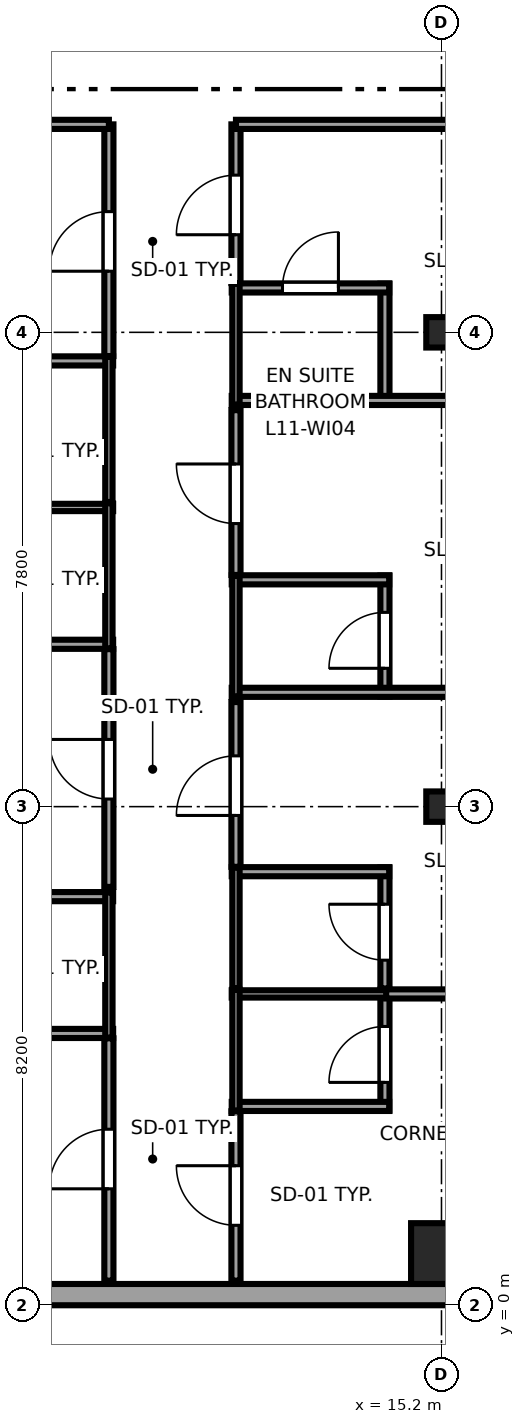
"""IFC4 building model, lengths in metres.
Left out: names, types, materials, properties, quantities, classifications, styles, units other than length and angle.
Written with IfcOpenShell. Run it as: python <this file> out.ifc"""

import sys

from ifc_helpers import new_model, si_unit, direction, frame, frame_2d, origin, origin_2d, place, context, subcontext, project, spatial, rectangle, i_section, extrude, source, transform, mapped, element, fill, save


model = new_model("IFC4")
c1 = context("Model", 3, precision=1e-05, world=origin(), true_north=direction((0.0, 1.0)))
c2 = subcontext(c1, "Body", "Model", "MODEL_VIEW")
j1 = project(units=[si_unit("LENGTHUNIT", "METRE"), si_unit("PLANEANGLEUNIT", "RADIAN")], contexts=[c1])
p1 = place(None, origin())
s1 = spatial("IfcSite", under=j1, at=p1, CompositionType="ELEMENT")
p2 = place(p1, origin())
s2 = spatial("IfcBuilding", under=s1, at=p2, CompositionType="ELEMENT")
p3 = place(p2, frame((0.0, 0.0, 49.75)))
s3 = spatial("IfcBuildingStorey", under=s2, at=p3, CompositionType="ELEMENT", Elevation=49.75)
m1 = source(origin(), c2, "Body", "SweptSolid", [
    extrude(rectangle(XDim=1.0, YDim=1.0, at=origin_2d()), origin(), (0.0, 0.0, 1.0), 3.55),
])
p4 = place(p3, frame((15.2, 0.85, 0.0), z_axis=(0.0, 0.0, 1.0), x_axis=(1.0, 0.0, 0.0)))
e1 = element("IfcColumn", 1, at=p4, inside=s3, PredefinedType="COLUMN", context=c2, shape_type="MappedRepresentation", body=[
    mapped(m1, transform((0.0, 0.0, 0.0), x_axis=(1.0, 0.0, 0.0), y_axis=(0.0, 1.0, 0.0), z_axis=(0.0, 0.0, 1.0), scale=1.0)),
])
m2 = source(origin(), c2, "Body", "SweptSolid", [
    extrude(i_section(OverallWidth=0.5, OverallDepth=0.5, WebThickness=0.028, FlangeThickness=0.045, at=origin_2d()), origin(), (0.0, 0.0, 1.0), 3.55),
])
for number, where, z_axis, x_axis in (
    (2, (15.2, 8.2, 0.0), (0.0, 0.0, 1.0), (1.0, 0.0, 0.0)),
    (3, (15.2, 16.0, 0.0), (0.0, 0.0, 1.0), (1.0, 0.0, 0.0)),
):
    element("IfcColumn", number, at=place(p3, frame(where, z_axis=z_axis, x_axis=x_axis)), inside=s3, PredefinedType="COLUMN", context=c2, shape_type="MappedRepresentation", body=[
        mapped(m2, transform((0.0, 0.0, 0.0), x_axis=(1.0, 0.0, 0.0), y_axis=(0.0, 1.0, 0.0), z_axis=(0.0, 0.0, 1.0), scale=1.0)),
    ])
p5 = place(p3, frame((4.617, 0.175, 0.0), z_axis=(0.0, 0.0, 1.0), x_axis=(1.0, 0.0, 0.0)))
e4 = element("IfcWall", 4, at=p5, inside=s3, PredefinedType="SOLIDWALL", context=c2, shape_type="SweptSolid", body=[
    extrude(rectangle(XDim=18.008, YDim=0.35, at=frame_2d((9.004, 0.0))), origin(), (0.0, 0.0, 1.0), 3.37),
])
p6 = place(p5, frame((14.407, 0.0, 0.68)))
e5 = element("IfcOpeningElement", 5, at=p6, cuts=e4, PredefinedType="OPENING", context=c2, shape_type="SweptSolid", body=[
    extrude(rectangle(XDim=1.8, YDim=1.85, at=frame_2d((0.9, 0.925))), frame((0.0, 0.185, 0.0), z_axis=(0.0, -1.0, 0.0), x_axis=(1.0, 0.0, 0.0)), (0.0, 0.0, 1.0), 0.37),
])
for number, where, z_axis, x_axis in (
    (6, (7.21, 4.47, 0.0), (0.0, 0.0, 1.0), (1.0, 0.0, 0.0)),
    (7, (7.21, 6.72, 0.0), (0.0, 0.0, 1.0), (1.0, 0.0, 0.0)),
):
    element("IfcWall", number, at=place(p3, frame(where, z_axis=z_axis, x_axis=x_axis)), inside=s3, PredefinedType="PARTITIONING", context=c2, shape_type="SweptSolid", body=[
        extrude(rectangle(XDim=2.59, YDim=0.15, at=frame_2d((1.295, 0.0))), origin(), (0.0, 0.0, 1.0), 3.37),
    ])
p7 = place(p3, frame((9.73, 4.4, 0.0), z_axis=(0.0, 0.0, 1.0), x_axis=(0.0, 1.0, 0.0)))
e8 = element("IfcWall", 8, at=p7, inside=s3, PredefinedType="PLUMBINGWALL", context=c2, shape_type="SweptSolid", body=[
    extrude(rectangle(XDim=2.39, YDim=0.12, at=frame_2d((1.195, 0.0))), origin(), (0.0, 0.0, 1.0), 3.37),
])
p8 = place(p3, frame((7.21, 10.87, 0.0), z_axis=(0.0, 0.0, 1.0), x_axis=(1.0, 0.0, 0.0)))
e9 = element("IfcWall", 9, at=p8, inside=s3, PredefinedType="PARTITIONING", context=c2, shape_type="SweptSolid", body=[
    extrude(rectangle(XDim=2.59, YDim=0.15, at=frame_2d((1.295, 0.0))), origin(), (0.0, 0.0, 1.0), 3.37),
])
p9 = place(p3, frame((7.21, 13.12, 0.0), z_axis=(0.0, 0.0, 1.0), x_axis=(1.0, 0.0, 0.0)))
e10 = element("IfcWall", 10, at=p9, inside=s3, PredefinedType="PLUMBINGWALL", context=c2, shape_type="SweptSolid", body=[
    extrude(rectangle(XDim=2.59, YDim=0.12, at=frame_2d((1.295, 0.0))), origin(), (0.0, 0.0, 1.0), 3.37),
])
p10 = place(p3, frame((9.73, 10.8, 0.0), z_axis=(0.0, 0.0, 1.0), x_axis=(0.0, 1.0, 0.0)))
e11 = element("IfcWall", 11, at=p10, inside=s3, PredefinedType="PLUMBINGWALL", context=c2, shape_type="SweptSolid", body=[
    extrude(rectangle(XDim=2.39, YDim=0.12, at=frame_2d((1.195, 0.0))), origin(), (0.0, 0.0, 1.0), 3.37),
])
p11 = place(p3, frame((7.21, 15.53, 0.0), z_axis=(0.0, 0.0, 1.0), x_axis=(1.0, 0.0, 0.0)))
e12 = element("IfcWall", 12, at=p11, inside=s3, PredefinedType="PARTITIONING", context=c2, shape_type="SweptSolid", body=[
    extrude(rectangle(XDim=2.59, YDim=0.15, at=frame_2d((1.295, 0.0))), origin(), (0.0, 0.0, 1.0), 3.37),
])
p12 = place(p3, frame((9.73, 13.21, 0.0), z_axis=(0.0, 0.0, 1.0), x_axis=(0.0, 1.0, 0.0)))
e13 = element("IfcWall", 13, at=p12, inside=s3, PredefinedType="PLUMBINGWALL", context=c2, shape_type="SweptSolid", body=[
    extrude(rectangle(XDim=2.39, YDim=0.12, at=frame_2d((1.195, 0.0))), origin(), (0.0, 0.0, 1.0), 3.37),
])
p13 = place(p3, frame((14.27, 3.2, 0.0), z_axis=(0.0, 0.0, 1.0), x_axis=(0.0, 1.0, 0.0)))
e14 = element("IfcWall", 14, at=p13, inside=s3, PredefinedType="PARTITIONING", context=c2, shape_type="SweptSolid", body=[
    extrude(rectangle(XDim=1.99, YDim=0.15, at=frame_2d((0.995, 0.0))), origin(), (0.0, 0.0, 1.0), 3.37),
])
p14 = place(p13, frame((0.465, 0.0, 0.0)))
e15 = element("IfcOpeningElement", 15, at=p14, cuts=e14, PredefinedType="OPENING", context=c2, shape_type="SweptSolid", body=[
    extrude(rectangle(XDim=0.92, YDim=2.01, at=frame_2d((0.46, 1.005))), frame((0.0, 0.085, 0.0), z_axis=(0.0, -1.0, 0.0), x_axis=(1.0, 0.0, 0.0)), (0.0, 0.0, 1.0), 0.17),
])
p15 = place(p3, frame((11.75, 3.27, 0.0), z_axis=(0.0, 0.0, 1.0), x_axis=(1.0, 0.0, 0.0)))
e16 = element("IfcWall", 16, at=p15, inside=s3, PredefinedType="PARTITIONING", context=c2, shape_type="SweptSolid", body=[
    extrude(rectangle(XDim=2.59, YDim=0.15, at=frame_2d((1.295, 0.0))), origin(), (0.0, 0.0, 1.0), 3.37),
])
p16 = place(p3, frame((11.75, 5.12, 0.0), z_axis=(0.0, 0.0, 1.0), x_axis=(1.0, 0.0, 0.0)))
e17 = element("IfcWall", 17, at=p16, inside=s3, PredefinedType="PLUMBINGWALL", context=c2, shape_type="SweptSolid", body=[
    extrude(rectangle(XDim=2.59, YDim=0.12, at=frame_2d((1.295, 0.0))), origin(), (0.0, 0.0, 1.0), 3.37),
])
p17 = place(p3, frame((11.82, 3.2, 0.0), z_axis=(0.0, 0.0, 1.0), x_axis=(0.0, 1.0, 0.0)))
e18 = element("IfcWall", 18, at=p17, inside=s3, PredefinedType="PLUMBINGWALL", context=c2, shape_type="SweptSolid", body=[
    extrude(rectangle(XDim=1.99, YDim=0.12, at=frame_2d((0.995, 0.0))), origin(), (0.0, 0.0, 1.0), 3.37),
])
p18 = place(p3, frame((14.27, 5.21, 0.0), z_axis=(0.0, 0.0, 1.0), x_axis=(0.0, 1.0, 0.0)))
e19 = element("IfcWall", 19, at=p18, inside=s3, PredefinedType="PARTITIONING", context=c2, shape_type="SweptSolid", body=[
    extrude(rectangle(XDim=1.99, YDim=0.15, at=frame_2d((0.995, 0.0))), origin(), (0.0, 0.0, 1.0), 3.37),
])
p19 = place(p18, frame((0.465, 0.0, 0.0)))
e20 = element("IfcOpeningElement", 20, at=p19, cuts=e19, PredefinedType="OPENING", context=c2, shape_type="SweptSolid", body=[
    extrude(rectangle(XDim=0.92, YDim=2.01, at=frame_2d((0.46, 1.005))), frame((0.0, 0.085, 0.0), z_axis=(0.0, -1.0, 0.0), x_axis=(1.0, 0.0, 0.0)), (0.0, 0.0, 1.0), 0.17),
])
p20 = place(p3, frame((11.75, 7.13, 0.0), z_axis=(0.0, 0.0, 1.0), x_axis=(1.0, 0.0, 0.0)))
e21 = element("IfcWall", 21, at=p20, inside=s3, PredefinedType="PARTITIONING", context=c2, shape_type="SweptSolid", body=[
    extrude(rectangle(XDim=2.59, YDim=0.15, at=frame_2d((1.295, 0.0))), origin(), (0.0, 0.0, 1.0), 3.37),
])
p21 = place(p3, frame((11.82, 5.21, 0.0), z_axis=(0.0, 0.0, 1.0), x_axis=(0.0, 1.0, 0.0)))
e22 = element("IfcWall", 22, at=p21, inside=s3, PredefinedType="PLUMBINGWALL", context=c2, shape_type="SweptSolid", body=[
    extrude(rectangle(XDim=1.99, YDim=0.12, at=frame_2d((0.995, 0.0))), origin(), (0.0, 0.0, 1.0), 3.37),
])
p22 = place(p3, frame((14.27, 10.01, 0.0), z_axis=(0.0, 0.0, 1.0), x_axis=(0.0, 1.0, 0.0)))
e23 = element("IfcWall", 23, at=p22, inside=s3, PredefinedType="PARTITIONING", context=c2, shape_type="SweptSolid", body=[
    extrude(rectangle(XDim=1.99, YDim=0.15, at=frame_2d((0.995, 0.0))), origin(), (0.0, 0.0, 1.0), 3.37),
])
p23 = place(p22, frame((0.465, 0.0, 0.0)))
e24 = element("IfcOpeningElement", 24, at=p23, cuts=e23, PredefinedType="OPENING", context=c2, shape_type="SweptSolid", body=[
    extrude(rectangle(XDim=0.92, YDim=2.01, at=frame_2d((0.46, 1.005))), frame((0.0, 0.085, 0.0), z_axis=(0.0, -1.0, 0.0), x_axis=(1.0, 0.0, 0.0)), (0.0, 0.0, 1.0), 0.17),
])
p24 = place(p3, frame((11.75, 10.08, 0.0), z_axis=(0.0, 0.0, 1.0), x_axis=(1.0, 0.0, 0.0)))
e25 = element("IfcWall", 25, at=p24, inside=s3, PredefinedType="PARTITIONING", context=c2, shape_type="SweptSolid", body=[
    extrude(rectangle(XDim=10.6, YDim=0.15, at=frame_2d((5.3, 0.0))), origin(), (0.0, 0.0, 1.0), 3.37),
])
p25 = place(p3, frame((11.75, 11.93, 0.0), z_axis=(0.0, 0.0, 1.0), x_axis=(1.0, 0.0, 0.0)))
e26 = element("IfcWall", 26, at=p25, inside=s3, PredefinedType="PARTITIONING", context=c2, shape_type="SweptSolid", body=[
    extrude(rectangle(XDim=2.59, YDim=0.15, at=frame_2d((1.295, 0.0))), origin(), (0.0, 0.0, 1.0), 3.37),
])
p26 = place(p3, frame((11.82, 10.01, 0.0), z_axis=(0.0, 0.0, 1.0), x_axis=(0.0, 1.0, 0.0)))
e27 = element("IfcWall", 27, at=p26, inside=s3, PredefinedType="PLUMBINGWALL", context=c2, shape_type="SweptSolid", body=[
    extrude(rectangle(XDim=1.99, YDim=0.12, at=frame_2d((0.995, 0.0))), origin(), (0.0, 0.0, 1.0), 3.37),
])
p27 = place(p3, frame((14.27, 14.81, 0.0), z_axis=(0.0, 0.0, 1.0), x_axis=(0.0, 1.0, 0.0)))
e28 = element("IfcWall", 28, at=p27, inside=s3, PredefinedType="PARTITIONING", context=c2, shape_type="SweptSolid", body=[
    extrude(rectangle(XDim=1.99, YDim=0.15, at=frame_2d((0.995, 0.0))), origin(), (0.0, 0.0, 1.0), 3.37),
])
p28 = place(p3, frame((11.75, 14.88, 0.0), z_axis=(0.0, 0.0, 1.0), x_axis=(1.0, 0.0, 0.0)))
e29 = element("IfcWall", 29, at=p28, inside=s3, PredefinedType="PARTITIONING", context=c2, shape_type="SweptSolid", body=[
    extrude(rectangle(XDim=10.6, YDim=0.15, at=frame_2d((5.3, 0.0))), origin(), (0.0, 0.0, 1.0), 3.37),
])
p29 = place(p3, frame((11.75, 16.73, 0.0), z_axis=(0.0, 0.0, 1.0), x_axis=(1.0, 0.0, 0.0)))
e30 = element("IfcWall", 30, at=p29, inside=s3, PredefinedType="PARTITIONING", context=c2, shape_type="SweptSolid", body=[
    extrude(rectangle(XDim=2.59, YDim=0.15, at=frame_2d((1.295, 0.0))), origin(), (0.0, 0.0, 1.0), 3.37),
])
p30 = place(p29, frame((0.835, 0.0, 0.0)))
e31 = element("IfcOpeningElement", 31, at=p30, cuts=e30, PredefinedType="OPENING", context=c2, shape_type="SweptSolid", body=[
    extrude(rectangle(XDim=0.92, YDim=2.01, at=frame_2d((0.46, 1.005))), frame((0.0, 0.085, 0.0), z_axis=(0.0, -1.0, 0.0), x_axis=(1.0, 0.0, 0.0)), (0.0, 0.0, 1.0), 0.17),
])
p31 = place(p3, frame((11.82, 14.81, 0.0), z_axis=(0.0, 0.0, 1.0), x_axis=(0.0, 1.0, 0.0)))
e32 = element("IfcWall", 32, at=p31, inside=s3, PredefinedType="PLUMBINGWALL", context=c2, shape_type="SweptSolid", body=[
    extrude(rectangle(XDim=1.99, YDim=0.12, at=frame_2d((0.995, 0.0))), origin(), (0.0, 0.0, 1.0), 3.37),
])
p32 = place(p3, frame((9.73, 0.405, 0.0), z_axis=(0.0, 0.0, 1.0), x_axis=(0.0, 1.0, 0.0)))
e33 = element("IfcWall", 33, at=p32, inside=s3, PredefinedType="PARTITIONING", context=c2, shape_type="SweptSolid", body=[
    extrude(rectangle(XDim=3.985, YDim=0.15, at=frame_2d((1.992, 0.0))), origin(), (0.0, 0.0, 1.0), 3.37),
])
p33 = place(p32, frame((1.51, 0.0, 0.0)))
e34 = element("IfcOpeningElement", 34, at=p33, cuts=e33, PredefinedType="OPENING", context=c2, shape_type="SweptSolid", body=[
    extrude(rectangle(XDim=0.98, YDim=2.12, at=frame_2d((0.49, 1.06))), frame((0.0, 0.085, 0.0), z_axis=(0.0, -1.0, 0.0), x_axis=(1.0, 0.0, 0.0)), (0.0, 0.0, 1.0), 0.17),
])
p34 = place(p3, frame((9.73, 6.88, 0.0), z_axis=(0.0, 0.0, 1.0), x_axis=(0.0, 1.0, 0.0)))
e35 = element("IfcWall", 35, at=p34, inside=s3, PredefinedType="PARTITIONING", context=c2, shape_type="SweptSolid", body=[
    extrude(rectangle(XDim=3.91, YDim=0.15, at=frame_2d((1.955, 0.0))), origin(), (0.0, 0.0, 1.0), 3.37),
])
p35 = place(p34, frame((1.445, 0.0, 0.0)))
e36 = element("IfcOpeningElement", 36, at=p35, cuts=e35, PredefinedType="OPENING", context=c2, shape_type="SweptSolid", body=[
    extrude(rectangle(XDim=0.98, YDim=2.12, at=frame_2d((0.49, 1.06))), frame((0.0, 0.085, 0.0), z_axis=(0.0, -1.0, 0.0), x_axis=(1.0, 0.0, 0.0)), (0.0, 0.0, 1.0), 0.17),
])
p36 = place(p3, frame((9.73, 15.61, 0.0), z_axis=(0.0, 0.0, 1.0), x_axis=(0.0, 1.0, 0.0)))
e37 = element("IfcWall", 37, at=p36, inside=s3, PredefinedType="PARTITIONING", context=c2, shape_type="SweptSolid", body=[
    extrude(rectangle(XDim=3.81, YDim=0.15, at=frame_2d((1.905, 0.0))), origin(), (0.0, 0.0, 1.0), 3.37),
])
p37 = place(p36, frame((1.395, 0.0, 0.0)))
e38 = element("IfcOpeningElement", 38, at=p37, cuts=e37, PredefinedType="OPENING", context=c2, shape_type="SweptSolid", body=[
    extrude(rectangle(XDim=0.98, YDim=2.12, at=frame_2d((0.49, 1.06))), frame((0.0, 0.085, 0.0), z_axis=(0.0, -1.0, 0.0), x_axis=(1.0, 0.0, 0.0)), (0.0, 0.0, 1.0), 0.17),
])
p38 = place(p3, frame((0.405, 19.42, 0.0), z_axis=(0.0, 0.0, 1.0), x_axis=(1.0, 0.0, 0.0)))
e39 = element("IfcWall", 39, at=p38, inside=s3, PredefinedType="PARTITIONING", context=c2, shape_type="SweptSolid", body=[
    extrude(rectangle(XDim=9.325, YDim=0.15, at=frame_2d((4.663, 0.0))), origin(), (0.0, 0.0, 1.0), 3.37),
])
p39 = place(p3, frame((11.82, 0.405, 0.0), z_axis=(0.0, 0.0, 1.0), x_axis=(0.0, 1.0, 0.0)))
e40 = element("IfcWall", 40, at=p39, inside=s3, PredefinedType="PARTITIONING", context=c2, shape_type="SweptSolid", body=[
    extrude(rectangle(XDim=2.785, YDim=0.15, at=frame_2d((1.393, 0.0))), origin(), (0.0, 0.0, 1.0), 3.37),
])
p40 = place(p39, frame((0.91, 0.0, 0.0)))
e41 = element("IfcOpeningElement", 41, at=p40, cuts=e40, PredefinedType="OPENING", context=c2, shape_type="SweptSolid", body=[
    extrude(rectangle(XDim=0.98, YDim=2.12, at=frame_2d((0.49, 1.06))), frame((0.0, 0.085, 0.0), z_axis=(0.0, -1.0, 0.0), x_axis=(1.0, 0.0, 0.0)), (0.0, 0.0, 1.0), 0.17),
])
p41 = place(p3, frame((14.29, 5.12, 0.0), z_axis=(0.0, 0.0, 1.0), x_axis=(1.0, 0.0, 0.0)))
e42 = element("IfcWall", 42, at=p41, inside=s3, PredefinedType="PARTITIONING", context=c2, shape_type="SweptSolid", body=[
    extrude(rectangle(XDim=8.06, YDim=0.15, at=frame_2d((4.03, 0.0))), origin(), (0.0, 0.0, 1.0), 3.37),
])
p42 = place(p3, frame((11.82, 7.21, 0.0), z_axis=(0.0, 0.0, 1.0), x_axis=(0.0, 1.0, 0.0)))
e43 = element("IfcWall", 43, at=p42, inside=s3, PredefinedType="PARTITIONING", context=c2, shape_type="SweptSolid", body=[
    extrude(rectangle(XDim=2.71, YDim=0.15, at=frame_2d((1.355, 0.0))), origin(), (0.0, 0.0, 1.0), 3.37),
])
p43 = place(p42, frame((0.845, 0.0, 0.0)))
e44 = element("IfcOpeningElement", 44, at=p43, cuts=e43, PredefinedType="OPENING", context=c2, shape_type="SweptSolid", body=[
    extrude(rectangle(XDim=0.98, YDim=2.12, at=frame_2d((0.49, 1.06))), frame((0.0, 0.085, 0.0), z_axis=(0.0, -1.0, 0.0), x_axis=(1.0, 0.0, 0.0)), (0.0, 0.0, 1.0), 0.17),
])
p44 = place(p3, frame((11.82, 12.01, 0.0), z_axis=(0.0, 0.0, 1.0), x_axis=(0.0, 1.0, 0.0)))
e45 = element("IfcWall", 45, at=p44, inside=s3, PredefinedType="PARTITIONING", context=c2, shape_type="SweptSolid", body=[
    extrude(rectangle(XDim=2.71, YDim=0.15, at=frame_2d((1.355, 0.0))), origin(), (0.0, 0.0, 1.0), 3.37),
])
p45 = place(p44, frame((0.845, 0.0, 0.0)))
e46 = element("IfcOpeningElement", 46, at=p45, cuts=e45, PredefinedType="OPENING", context=c2, shape_type="SweptSolid", body=[
    extrude(rectangle(XDim=0.98, YDim=2.12, at=frame_2d((0.49, 1.06))), frame((0.0, 0.085, 0.0), z_axis=(0.0, -1.0, 0.0), x_axis=(1.0, 0.0, 0.0)), (0.0, 0.0, 1.0), 0.17),
])
p46 = place(p3, frame((11.82, 16.81, 0.0), z_axis=(0.0, 0.0, 1.0), x_axis=(0.0, 1.0, 0.0)))
e47 = element("IfcWall", 47, at=p46, inside=s3, PredefinedType="PARTITIONING", context=c2, shape_type="SweptSolid", body=[
    extrude(rectangle(XDim=2.61, YDim=0.15, at=frame_2d((1.305, 0.0))), origin(), (0.0, 0.0, 1.0), 3.37),
])
p47 = place(p46, frame((0.795, 0.0, 0.0)))
e48 = element("IfcOpeningElement", 48, at=p47, cuts=e47, PredefinedType="OPENING", context=c2, shape_type="SweptSolid", body=[
    extrude(rectangle(XDim=0.98, YDim=2.12, at=frame_2d((0.49, 1.06))), frame((0.0, 0.085, 0.0), z_axis=(0.0, -1.0, 0.0), x_axis=(1.0, 0.0, 0.0)), (0.0, 0.0, 1.0), 0.17),
])
p48 = place(p3, frame((11.82, 19.42, 0.0), z_axis=(0.0, 0.0, 1.0), x_axis=(1.0, 0.0, 0.0)))
e49 = element("IfcWall", 49, at=p48, inside=s3, PredefinedType="PARTITIONING", context=c2, shape_type="SweptSolid", body=[
    extrude(rectangle(XDim=10.53, YDim=0.15, at=frame_2d((5.265, 0.0))), origin(), (0.0, 0.0, 1.0), 3.37),
])
m3 = source(origin(), c2, "Body", "SweptSolid", [
    extrude(rectangle(XDim=0.92, YDim=2.01, at=frame_2d((0.46, 1.005))), frame((0.0, 0.025, 0.0), z_axis=(0.0, -1.0, 0.0), x_axis=(1.0, 0.0, 0.0)), (0.0, 0.0, 1.0), 0.05),
])
p49 = place(p14, origin())
e50 = element("IfcDoor", 50, at=p49, inside=s3, OperationType="SINGLE_SWING_LEFT", PredefinedType="DOOR", context=c2, shape_type="MappedRepresentation", body=[
    mapped(m3, transform((0.0, 0.0, 0.0), x_axis=(1.0, 0.0, 0.0), y_axis=(0.0, 1.0, 0.0), z_axis=(0.0, 0.0, 1.0), scale=1.0)),
])
fill(e15, e50)
p50 = place(p19, origin())
e51 = element("IfcDoor", 51, at=p50, inside=s3, OperationType="SINGLE_SWING_RIGHT", PredefinedType="DOOR", context=c2, shape_type="MappedRepresentation", body=[
    mapped(m3, transform((0.0, 0.0, 0.0), x_axis=(1.0, 0.0, 0.0), y_axis=(0.0, 1.0, 0.0), z_axis=(0.0, 0.0, 1.0), scale=1.0)),
])
fill(e20, e51)
p51 = place(p23, origin())
e52 = element("IfcDoor", 52, at=p51, inside=s3, OperationType="SINGLE_SWING_LEFT", PredefinedType="DOOR", context=c2, shape_type="MappedRepresentation", body=[
    mapped(m3, transform((0.0, 0.0, 0.0), x_axis=(1.0, 0.0, 0.0), y_axis=(0.0, 1.0, 0.0), z_axis=(0.0, 0.0, 1.0), scale=1.0)),
])
fill(e24, e52)
p52 = place(p30, origin())
e53 = element("IfcDoor", 53, at=p52, inside=s3, OperationType="SINGLE_SWING_RIGHT", PredefinedType="DOOR", context=c2, shape_type="MappedRepresentation", body=[
    mapped(m3, transform((0.0, 0.0, 0.0), x_axis=(1.0, 0.0, 0.0), y_axis=(0.0, 1.0, 0.0), z_axis=(0.0, 0.0, 1.0), scale=1.0)),
])
fill(e31, e53)
m4 = source(origin(), c2, "Body", "SweptSolid", [
    extrude(rectangle(XDim=0.98, YDim=2.12, at=frame_2d((0.49, 1.06))), frame((0.0, 0.025, 0.0), z_axis=(0.0, -1.0, 0.0), x_axis=(1.0, 0.0, 0.0)), (0.0, 0.0, 1.0), 0.05),
])
p53 = place(p33, origin())
e54 = element("IfcDoor", 54, at=p53, inside=s3, OperationType="SINGLE_SWING_LEFT", PredefinedType="DOOR", context=c2, shape_type="MappedRepresentation", body=[
    mapped(m4, transform((0.0, 0.0, 0.0), x_axis=(1.0, 0.0, 0.0), y_axis=(0.0, 1.0, 0.0), z_axis=(0.0, 0.0, 1.0), scale=1.0)),
])
fill(e34, e54)
p54 = place(p35, origin())
e55 = element("IfcDoor", 55, at=p54, inside=s3, OperationType="SINGLE_SWING_RIGHT", PredefinedType="DOOR", context=c2, shape_type="MappedRepresentation", body=[
    mapped(m4, transform((0.0, 0.0, 0.0), x_axis=(1.0, 0.0, 0.0), y_axis=(0.0, 1.0, 0.0), z_axis=(0.0, 0.0, 1.0), scale=1.0)),
])
fill(e36, e55)
p55 = place(p37, origin())
e56 = element("IfcDoor", 56, at=p55, inside=s3, OperationType="SINGLE_SWING_LEFT", PredefinedType="DOOR", context=c2, shape_type="MappedRepresentation", body=[
    mapped(m4, transform((0.0, 0.0, 0.0), x_axis=(1.0, 0.0, 0.0), y_axis=(0.0, 1.0, 0.0), z_axis=(0.0, 0.0, 1.0), scale=1.0)),
])
fill(e38, e56)
p56 = place(p40, origin())
e57 = element("IfcDoor", 57, at=p56, inside=s3, OperationType="SINGLE_SWING_RIGHT", PredefinedType="DOOR", context=c2, shape_type="MappedRepresentation", body=[
    mapped(m4, transform((0.0, 0.0, 0.0), x_axis=(1.0, 0.0, 0.0), y_axis=(0.0, 1.0, 0.0), z_axis=(0.0, 0.0, 1.0), scale=1.0)),
])
fill(e41, e57)
p57 = place(p43, origin())
e58 = element("IfcDoor", 58, at=p57, inside=s3, OperationType="SINGLE_SWING_LEFT", PredefinedType="DOOR", context=c2, shape_type="MappedRepresentation", body=[
    mapped(m4, transform((0.0, 0.0, 0.0), x_axis=(1.0, 0.0, 0.0), y_axis=(0.0, 1.0, 0.0), z_axis=(0.0, 0.0, 1.0), scale=1.0)),
])
fill(e44, e58)
p58 = place(p45, origin())
e59 = element("IfcDoor", 59, at=p58, inside=s3, OperationType="SINGLE_SWING_RIGHT", PredefinedType="DOOR", context=c2, shape_type="MappedRepresentation", body=[
    mapped(m4, transform((0.0, 0.0, 0.0), x_axis=(1.0, 0.0, 0.0), y_axis=(0.0, 1.0, 0.0), z_axis=(0.0, 0.0, 1.0), scale=1.0)),
])
fill(e46, e59)
p59 = place(p47, origin())
e60 = element("IfcDoor", 60, at=p59, inside=s3, OperationType="SINGLE_SWING_LEFT", PredefinedType="DOOR", context=c2, shape_type="MappedRepresentation", body=[
    mapped(m4, transform((0.0, 0.0, 0.0), x_axis=(1.0, 0.0, 0.0), y_axis=(0.0, 1.0, 0.0), z_axis=(0.0, 0.0, 1.0), scale=1.0)),
])
fill(e48, e60)
save(model, sys.argv[1])
